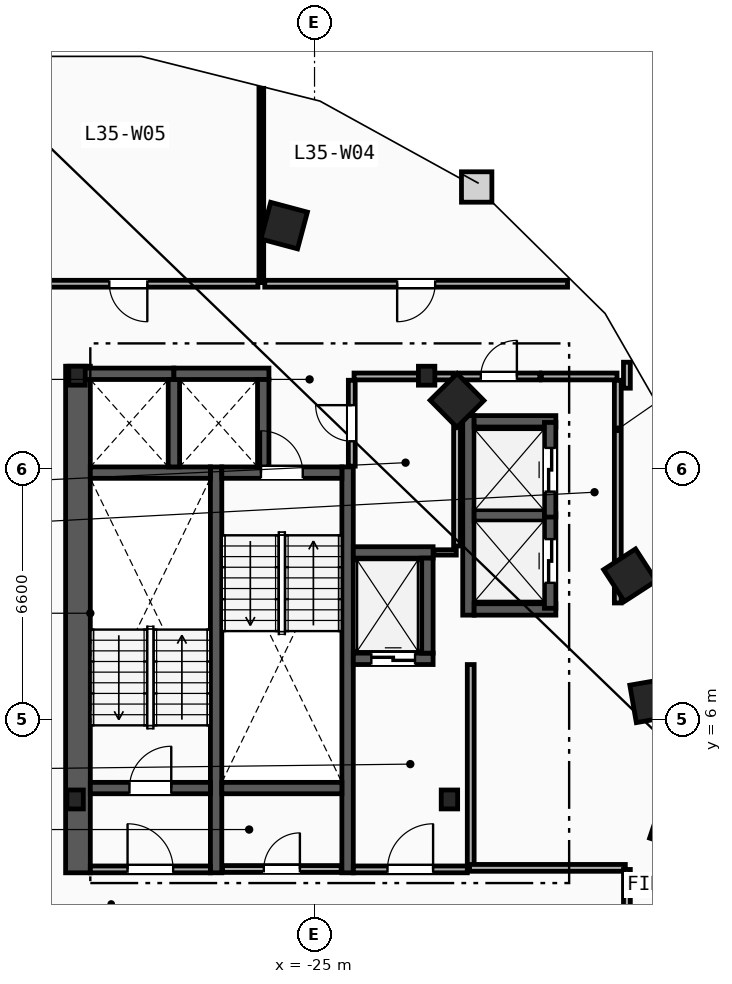
"""IFC4 building model, lengths in metres.
Left out: names, types, materials, properties, quantities, classifications, styles, units other than length and angle.
Written with IfcOpenShell. Run it as: python <this file> out.ifc"""

import sys

from ifc_helpers import new_model, si_unit, direction, frame, frame_2d, origin, origin_2d, place, context, subcontext, project, spatial, rectangle, i_section, extrude, element, fill, save


model = new_model("IFC4")
c1 = context("Model", 3, precision=1e-05, world=origin(), true_north=direction((0.0, 1.0)))
c2 = subcontext(c1, "Body", "Model", "MODEL_VIEW")
j1 = project(units=[si_unit("LENGTHUNIT", "METRE"), si_unit("PLANEANGLEUNIT", "RADIAN")], contexts=[c1])
p1 = place(None, origin())
s1 = spatial("IfcSite", under=j1, at=p1, CompositionType="ELEMENT")
p2 = place(p1, origin())
s2 = spatial("IfcBuilding", under=s1, at=p2, CompositionType="ELEMENT")
p3 = place(p2, frame((0.0, 0.0, 136.8)))
s3 = spatial("IfcBuildingStorey", under=s2, at=p3, CompositionType="ELEMENT", Elevation=136.8)
for number, where, z_axis, x_axis in (
    (1, (-31.3, 3.9, 0.0), (0.0, 0.0, 1.0), (1.0, 0.0, 0.0)),
    (2, (-21.45, 3.9, 0.0), (0.0, 0.0, 1.0), (1.0, 0.0, 0.0)),
    (3, (-22.05, 15.05, 0.0), (0.0, 0.0, 1.0), (1.0, 0.0, 0.0)),
    (4, (-31.25, 15.05, 0.0), (0.0, 0.0, 1.0), (1.0, 0.0, 0.0)),
):
    element("IfcColumn", number, at=place(p3, frame(where, z_axis=z_axis, x_axis=x_axis)), inside=s3, PredefinedType="COLUMN", context=c2, shape_type="SweptSolid", body=[
        extrude(i_section(OverallWidth=0.432, OverallDepth=0.498, WebThickness=0.056, FlangeThickness=0.089, FilletRadius=0.018, at=origin_2d()), origin(), (0.0, 0.0, 1.0), 3.6),
    ])
for number, where, z_axis, x_axis in (
    (5, (-15.55, 3.2, 0.0), (0.0, 0.0, 1.0), (0.315, 0.949, 0.0)),
    (6, (-16.125, 6.5, 0.0), (0.0, 0.0, 1.0), (-0.172, 0.985, 0.0)),
    (7, (-16.7, 9.8, 0.0), (0.0, 0.0, 1.0), (-0.544, 0.839, 0.0)),
    (8, (-21.25, 14.4, 0.0), (0.0, 0.0, 1.0), (-0.703, 0.711, 0.0)),
    (9, (-25.8, 19.0, 0.0), (0.0, 0.0, 1.0), (-0.966, 0.259, 0.0)),
):
    element("IfcColumn", number, at=place(p3, frame(where, z_axis=z_axis, x_axis=x_axis)), inside=s3, PredefinedType="COLUMN", context=c2, shape_type="SweptSolid", body=[
        extrude(rectangle(XDim=1.0, YDim=1.0, at=origin_2d()), origin(), (0.0, 0.0, 1.0), 3.6),
    ])
p4 = place(p3, frame((-31.225, 1.97, 0.0), z_axis=(0.0, 0.0, 1.0), x_axis=(0.0, 1.0, 0.0)))
e10 = element("IfcWall", 10, at=p4, inside=s3, PredefinedType="SHEAR", context=c2, shape_type="SweptSolid", body=[
    extrude(rectangle(XDim=13.33, YDim=0.65, at=frame_2d((6.665, 0.0))), origin(), (0.0, 0.0, 1.0), 3.36),
])
for number, where, z_axis, x_axis in (
    (11, (-27.59, 1.97, 0.0), (0.0, 0.0, 1.0), (0.0, 1.0, 0.0)),
    (12, (-24.13, 1.97, 0.0), (0.0, 0.0, 1.0), (0.0, 1.0, 0.0)),
):
    element("IfcWall", number, at=place(p3, frame(where, z_axis=z_axis, x_axis=x_axis)), inside=s3, PredefinedType="SHEAR", context=c2, shape_type="SweptSolid", body=[
        extrude(rectangle(XDim=10.68, YDim=0.3, at=frame_2d((5.34, 0.0))), origin(), (0.0, 0.0, 1.0), 3.36),
    ])
p5 = place(p3, frame((-30.9, 4.2, 0.0), z_axis=(0.0, 0.0, 1.0), x_axis=(1.0, 0.0, 0.0)))
e13 = element("IfcWall", 13, at=p5, inside=s3, PredefinedType="SHEAR", context=c2, shape_type="SweptSolid", body=[
    extrude(rectangle(XDim=3.16, YDim=0.3, at=frame_2d((1.58, 0.0))), origin(), (0.0, 0.0, 1.0), 3.36),
])
p6 = place(p5, frame((1.03, 0.0, 0.0)))
e14 = element("IfcOpeningElement", 14, at=p6, cuts=e13, PredefinedType="OPENING", context=c2, shape_type="SweptSolid", body=[
    extrude(rectangle(XDim=1.1, YDim=2.15, at=frame_2d((0.55, 1.075))), frame((0.0, 0.16, 0.0), z_axis=(0.0, -1.0, 0.0), x_axis=(1.0, 0.0, 0.0)), (0.0, 0.0, 1.0), 0.32),
])
p7 = place(p3, frame((-30.9, 12.5, 0.0), z_axis=(0.0, 0.0, 1.0), x_axis=(1.0, 0.0, 0.0)))
e15 = element("IfcWall", 15, at=p7, inside=s3, PredefinedType="SHEAR", context=c2, shape_type="SweptSolid", body=[
    extrude(rectangle(XDim=3.16, YDim=0.3, at=frame_2d((1.58, 0.0))), origin(), (0.0, 0.0, 1.0), 3.36),
])
p8 = place(p3, frame((-27.44, 12.5, 0.0), z_axis=(0.0, 0.0, 1.0), x_axis=(1.0, 0.0, 0.0)))
e16 = element("IfcWall", 16, at=p8, inside=s3, PredefinedType="SHEAR", context=c2, shape_type="SweptSolid", body=[
    extrude(rectangle(XDim=3.16, YDim=0.3, at=frame_2d((1.58, 0.0))), origin(), (0.0, 0.0, 1.0), 3.36),
])
p9 = place(p8, frame((1.03, 0.0, 0.0)))
e17 = element("IfcOpeningElement", 17, at=p9, cuts=e16, PredefinedType="OPENING", context=c2, shape_type="SweptSolid", body=[
    extrude(rectangle(XDim=1.1, YDim=2.15, at=frame_2d((0.55, 1.075))), frame((0.0, 0.16, 0.0), z_axis=(0.0, -1.0, 0.0), x_axis=(1.0, 0.0, 0.0)), (0.0, 0.0, 1.0), 0.32),
])
p10 = place(p3, frame((-27.44, 4.2, 0.0), z_axis=(0.0, 0.0, 1.0), x_axis=(1.0, 0.0, 0.0)))
e18 = element("IfcWall", 18, at=p10, inside=s3, PredefinedType="SHEAR", context=c2, shape_type="SweptSolid", body=[
    extrude(rectangle(XDim=3.16, YDim=0.3, at=frame_2d((1.58, 0.0))), origin(), (0.0, 0.0, 1.0), 3.36),
])
p11 = place(p3, frame((-20.89, 2.15, 0.0), z_axis=(0.0, 0.0, 1.0), x_axis=(0.0, 1.0, 0.0)))
e19 = element("IfcWall", 19, at=p11, inside=s3, PredefinedType="PARTITIONING", context=c2, shape_type="SweptSolid", body=[
    extrude(rectangle(XDim=5.3, YDim=0.18, at=frame_2d((2.65, 0.0))), origin(), (0.0, 0.0, 1.0), 3.36),
])
p12 = place(p3, frame((-23.98, 2.06, 0.0), z_axis=(0.0, 0.0, 1.0), x_axis=(1.0, 0.0, 0.0)))
e20 = element("IfcWall", 20, at=p12, inside=s3, PredefinedType="PARTITIONING", context=c2, shape_type="SweptSolid", body=[
    extrude(rectangle(XDim=3.0, YDim=0.18, at=frame_2d((1.5, 0.0))), origin(), (0.0, 0.0, 1.0), 3.36),
])
p13 = place(p12, frame((0.9, 0.0, 0.0)))
e21 = element("IfcOpeningElement", 21, at=p13, cuts=e20, PredefinedType="OPENING", context=c2, shape_type="SweptSolid", body=[
    extrude(rectangle(XDim=1.2, YDim=2.15, at=frame_2d((0.6, 1.075))), frame((0.0, 0.1, 0.0), z_axis=(0.0, -1.0, 0.0), x_axis=(1.0, 0.0, 0.0)), (0.0, 0.0, 1.0), 0.2),
])
p14 = place(p3, frame((-30.9, 2.06, 0.0), z_axis=(0.0, 0.0, 1.0), x_axis=(1.0, 0.0, 0.0)))
e22 = element("IfcWall", 22, at=p14, inside=s3, PredefinedType="PARTITIONING", context=c2, shape_type="SweptSolid", body=[
    extrude(rectangle(XDim=3.16, YDim=0.18, at=frame_2d((1.58, 0.0))), origin(), (0.0, 0.0, 1.0), 3.36),
])
p15 = place(p14, frame((0.98, 0.0, 0.0)))
e23 = element("IfcOpeningElement", 23, at=p15, cuts=e22, PredefinedType="OPENING", context=c2, shape_type="SweptSolid", body=[
    extrude(rectangle(XDim=1.2, YDim=2.15, at=frame_2d((0.6, 1.075))), frame((0.0, 0.1, 0.0), z_axis=(0.0, -1.0, 0.0), x_axis=(1.0, 0.0, 0.0)), (0.0, 0.0, 1.0), 0.2),
])
p16 = place(p3, frame((-23.98, 7.6, 0.0), z_axis=(0.0, 0.0, 1.0), x_axis=(1.0, 0.0, 0.0)))
e24 = element("IfcWall", 24, at=p16, inside=s3, PredefinedType="SHEAR", context=c2, shape_type="SweptSolid", body=[
    extrude(rectangle(XDim=2.1, YDim=0.3, at=frame_2d((1.05, 0.0))), origin(), (0.0, 0.0, 1.0), 3.36),
])
p17 = place(p16, frame((0.475, 0.0, 0.0)))
e25 = element("IfcOpeningElement", 25, at=p17, cuts=e24, PredefinedType="OPENING", context=c2, shape_type="SweptSolid", body=[
    extrude(rectangle(XDim=1.15, YDim=2.2, at=frame_2d((0.575, 1.1))), frame((0.0, 0.16, 0.0), z_axis=(0.0, -1.0, 0.0), x_axis=(1.0, 0.0, 0.0)), (0.0, 0.0, 1.0), 0.32),
])
p18 = place(p3, frame((-23.98, 10.4, 0.0), z_axis=(0.0, 0.0, 1.0), x_axis=(1.0, 0.0, 0.0)))
e26 = element("IfcWall", 26, at=p18, inside=s3, PredefinedType="SHEAR", context=c2, shape_type="SweptSolid", body=[
    extrude(rectangle(XDim=2.1, YDim=0.3, at=frame_2d((1.05, 0.0))), origin(), (0.0, 0.0, 1.0), 3.36),
])
for number, where, z_axis, x_axis in (
    (27, (-22.03, 7.75, 0.0), (0.0, 0.0, 1.0), (0.0, 1.0, 0.0)),
    (28, (-31.2, 15.1, 0.0), (0.0, 0.0, 1.0), (1.0, 0.0, 0.0)),
):
    element("IfcWall", number, at=place(p3, frame(where, z_axis=z_axis, x_axis=x_axis)), inside=s3, PredefinedType="SHEAR", context=c2, shape_type="SweptSolid", body=[
        extrude(rectangle(XDim=2.5, YDim=0.3, at=frame_2d((1.25, 0.0))), origin(), (0.0, 0.0, 1.0), 3.36),
    ])
p19 = place(p3, frame((-28.7, 12.65, 0.0), z_axis=(0.0, 0.0, 1.0), x_axis=(0.0, 1.0, 0.0)))
e29 = element("IfcWall", 29, at=p19, inside=s3, PredefinedType="SHEAR", context=c2, shape_type="SweptSolid", body=[
    extrude(rectangle(XDim=2.3, YDim=0.3, at=frame_2d((1.15, 0.0))), origin(), (0.0, 0.0, 1.0), 3.36),
])
p20 = place(p3, frame((-28.7, 15.1, 0.0), z_axis=(0.0, 0.0, 1.0), x_axis=(1.0, 0.0, 0.0)))
e30 = element("IfcWall", 30, at=p20, inside=s3, PredefinedType="SHEAR", context=c2, shape_type="SweptSolid", body=[
    extrude(rectangle(XDim=2.5, YDim=0.3, at=frame_2d((1.25, 0.0))), origin(), (0.0, 0.0, 1.0), 3.36),
])
p21 = place(p3, frame((-26.35, 12.65, 0.0), z_axis=(0.0, 0.0, 1.0), x_axis=(0.0, 1.0, 0.0)))
e31 = element("IfcWall", 31, at=p21, inside=s3, PredefinedType="SHEAR", context=c2, shape_type="SweptSolid", body=[
    extrude(rectangle(XDim=2.3, YDim=0.3, at=frame_2d((1.15, 0.0))), origin(), (0.0, 0.0, 1.0), 3.36),
])
p22 = place(p3, frame((-20.95, 8.75, 0.0), z_axis=(0.0, 0.0, 1.0), x_axis=(0.0, 1.0, 0.0)))
e32 = element("IfcWall", 32, at=p22, inside=s3, PredefinedType="SHEAR", context=c2, shape_type="SweptSolid", body=[
    extrude(rectangle(XDim=5.25, YDim=0.3, at=frame_2d((2.625, 0.0))), origin(), (0.0, 0.0, 1.0), 3.36),
])
for number, where, z_axis, x_axis in (
    (33, (-20.8, 8.9, 0.0), (0.0, 0.0, 1.0), (1.0, 0.0, 0.0)),
    (34, (-20.8, 13.85, 0.0), (0.0, 0.0, 1.0), (1.0, 0.0, 0.0)),
):
    element("IfcWall", number, at=place(p3, frame(where, z_axis=z_axis, x_axis=x_axis)), inside=s3, PredefinedType="SHEAR", context=c2, shape_type="SweptSolid", body=[
        extrude(rectangle(XDim=2.15, YDim=0.3, at=frame_2d((1.075, 0.0))), origin(), (0.0, 0.0, 1.0), 3.36),
    ])
p23 = place(p3, frame((-20.8, 11.375, 0.0), z_axis=(0.0, 0.0, 1.0), x_axis=(1.0, 0.0, 0.0)))
e35 = element("IfcWall", 35, at=p23, inside=s3, PredefinedType="SHEAR", context=c2, shape_type="SweptSolid", body=[
    extrude(rectangle(XDim=1.85, YDim=0.3, at=frame_2d((0.925, 0.0))), origin(), (0.0, 0.0, 1.0), 3.36),
])
p24 = place(p3, frame((-18.8, 8.93, 0.0), z_axis=(0.0, 0.0, 1.0), x_axis=(0.0, 1.0, 0.0)))
e36 = element("IfcWall", 36, at=p24, inside=s3, PredefinedType="SHEAR", context=c2, shape_type="SweptSolid", body=[
    extrude(rectangle(XDim=2.49, YDim=0.3, at=frame_2d((1.245, 0.0))), origin(), (0.0, 0.0, 1.0), 3.36),
])
p25 = place(p24, frame((0.67, 0.0, 0.0)))
e37 = element("IfcOpeningElement", 37, at=p25, cuts=e36, PredefinedType="OPENING", context=c2, shape_type="SweptSolid", body=[
    extrude(rectangle(XDim=1.15, YDim=2.2, at=frame_2d((0.575, 1.1))), frame((0.0, 0.16, 0.0), z_axis=(0.0, -1.0, 0.0), x_axis=(1.0, 0.0, 0.0)), (0.0, 0.0, 1.0), 0.32),
])
p26 = place(p3, frame((-18.8, 11.33, 0.0), z_axis=(0.0, 0.0, 1.0), x_axis=(0.0, 1.0, 0.0)))
e38 = element("IfcWall", 38, at=p26, inside=s3, PredefinedType="SHEAR", context=c2, shape_type="SweptSolid", body=[
    extrude(rectangle(XDim=2.49, YDim=0.3, at=frame_2d((1.245, 0.0))), origin(), (0.0, 0.0, 1.0), 3.36),
])
p27 = place(p26, frame((0.67, 0.0, 0.0)))
e39 = element("IfcOpeningElement", 39, at=p27, cuts=e38, PredefinedType="OPENING", context=c2, shape_type="SweptSolid", body=[
    extrude(rectangle(XDim=1.15, YDim=2.2, at=frame_2d((0.575, 1.1))), frame((0.0, 0.16, 0.0), z_axis=(0.0, -1.0, 0.0), x_axis=(1.0, 0.0, 0.0)), (0.0, 0.0, 1.0), 0.32),
])
p28 = place(p3, frame((-17.02, 9.07, 0.0), z_axis=(0.0, 0.0, 1.0), x_axis=(0.0, 1.0, 0.0)))
e40 = element("IfcWall", 40, at=p28, inside=s3, PredefinedType="PARTITIONING", context=c2, shape_type="SweptSolid", body=[
    extrude(rectangle(XDim=5.86, YDim=0.18, at=frame_2d((2.93, 0.0))), origin(), (0.0, 0.0, 1.0), 3.36),
])
p29 = place(p3, frame((-21.23, 15.03, 0.0), z_axis=(0.0, 0.0, 1.0), x_axis=(1.0, 0.0, 0.0)))
e41 = element("IfcWall", 41, at=p29, inside=s3, PredefinedType="PARTITIONING", context=c2, shape_type="SweptSolid", body=[
    extrude(rectangle(XDim=2.16, YDim=0.18, at=frame_2d((1.08, 0.0))), origin(), (0.0, 0.0, 1.0), 3.36),
])
p30 = place(p29, frame((0.605, 0.0, 0.0)))
e42 = element("IfcOpeningElement", 42, at=p30, cuts=e41, PredefinedType="OPENING", context=c2, shape_type="SweptSolid", body=[
    extrude(rectangle(XDim=0.95, YDim=2.1, at=frame_2d((0.475, 1.05))), frame((0.0, 0.1, 0.0), z_axis=(0.0, -1.0, 0.0), x_axis=(1.0, 0.0, 0.0)), (0.0, 0.0, 1.0), 0.2),
])
p31 = place(p3, frame((-19.03, 15.03, 0.0), z_axis=(0.0, 0.0, 1.0), x_axis=(1.0, 0.0, 0.0)))
e43 = element("IfcWall", 43, at=p31, inside=s3, PredefinedType="PARTITIONING", context=c2, shape_type="SweptSolid", body=[
    extrude(rectangle(XDim=1.99, YDim=0.18, at=frame_2d((0.995, 0.0))), origin(), (0.0, 0.0, 1.0), 3.36),
])
p32 = place(p3, frame((-21.86, 10.4, 0.0), z_axis=(0.0, 0.0, 1.0), x_axis=(1.0, 0.0, 0.0)))
e44 = element("IfcWall", 44, at=p32, inside=s3, PredefinedType="PARTITIONING", context=c2, shape_type="SweptSolid", body=[
    extrude(rectangle(XDim=0.59, YDim=0.14, at=frame_2d((0.295, 0.0))), origin(), (0.0, 0.0, 1.0), 3.36),
])
p33 = place(p3, frame((-21.25, 10.57, 0.0), z_axis=(0.0, 0.0, 1.0), x_axis=(0.0, 1.0, 0.0)))
e45 = element("IfcWall", 45, at=p33, inside=s3, PredefinedType="PARTITIONING", context=c2, shape_type="SweptSolid", body=[
    extrude(rectangle(XDim=4.36, YDim=0.18, at=frame_2d((2.18, 0.0))), origin(), (0.0, 0.0, 1.0), 3.36),
])
p34 = place(p3, frame((-23.96, 15.03, 0.0), z_axis=(0.0, 0.0, 1.0), x_axis=(1.0, 0.0, 0.0)))
e46 = element("IfcWall", 46, at=p34, inside=s3, PredefinedType="PARTITIONING", context=c2, shape_type="SweptSolid", body=[
    extrude(rectangle(XDim=2.61, YDim=0.18, at=frame_2d((1.305, 0.0))), origin(), (0.0, 0.0, 1.0), 2.433),
])
p35 = place(p3, frame((-27.42, 2.07, 0.0), z_axis=(0.0, 0.0, 1.0), x_axis=(1.0, 0.0, 0.0)))
e47 = element("IfcWall", 47, at=p35, inside=s3, PredefinedType="PARTITIONING", context=c2, shape_type="SweptSolid", body=[
    extrude(rectangle(XDim=3.12, YDim=0.18, at=frame_2d((1.56, 0.0))), origin(), (0.0, 0.0, 1.0), 3.36),
])
p36 = place(p35, frame((1.085, 0.0, 0.0)))
e48 = element("IfcOpeningElement", 48, at=p36, cuts=e47, PredefinedType="OPENING", context=c2, shape_type="SweptSolid", body=[
    extrude(rectangle(XDim=0.95, YDim=2.1, at=frame_2d((0.475, 1.05))), frame((0.0, 0.1, 0.0), z_axis=(0.0, -1.0, 0.0), x_axis=(1.0, 0.0, 0.0)), (0.0, 0.0, 1.0), 0.2),
])
p37 = place(p3, frame((-24.02, 12.67, 0.0), z_axis=(0.0, 0.0, 1.0), x_axis=(0.0, 1.0, 0.0)))
e49 = element("IfcWall", 49, at=p37, inside=s3, PredefinedType="PARTITIONING", context=c2, shape_type="SweptSolid", body=[
    extrude(rectangle(XDim=2.26, YDim=0.18, at=frame_2d((1.13, 0.0))), origin(), (0.0, 0.0, 1.0), 3.36),
])
p38 = place(p37, frame((0.655, 0.0, 0.0)))
e50 = element("IfcOpeningElement", 50, at=p38, cuts=e49, PredefinedType="OPENING", context=c2, shape_type="SweptSolid", body=[
    extrude(rectangle(XDim=0.95, YDim=2.1, at=frame_2d((0.475, 1.05))), frame((0.0, 0.1, 0.0), z_axis=(0.0, -1.0, 0.0), x_axis=(1.0, 0.0, 0.0)), (0.0, 0.0, 1.0), 0.2),
])
p39 = place(p3, frame((-26.4, 17.5, 0.0), z_axis=(0.0, 0.0, 1.0), x_axis=(0.0, 1.0, 0.0)))
e51 = element("IfcWall", 51, at=p39, inside=s3, PredefinedType="PARTITIONING", context=c2, shape_type="SweptSolid", body=[
    extrude(rectangle(XDim=5.111, YDim=0.125, at=frame_2d((2.556, 0.0))), origin(), (0.0, 0.0, 1.0), 3.36),
])
p40 = place(p3, frame((-16.822, 2.1, 0.0), z_axis=(0.0, 0.0, 1.0), x_axis=(-1.0, 0.0, 0.0)))
e52 = element("IfcWall", 52, at=p40, inside=s3, PredefinedType="PARTITIONING", context=c2, shape_type="SweptSolid", body=[
    extrude(rectangle(XDim=4.098, YDim=0.18, at=frame_2d((2.049, 0.0))), origin(), (0.0, 0.0, 1.0), 3.36),
])
p41 = place(p3, frame((-16.78, -0.329, 0.0), z_axis=(0.0, 0.0, 1.0), x_axis=(0.0, 1.0, 0.0)))
e53 = element("IfcWall", 53, at=p41, inside=s3, PredefinedType="PARTITIONING", context=c2, shape_type="SweptSolid", body=[
    extrude(rectangle(XDim=2.387, YDim=0.18, at=frame_2d((1.194, 0.0))), origin(), (0.0, 0.0, 1.0), 3.36),
])
p42 = place(p3, frame((-16.78, 14.721, 0.0), z_axis=(0.0, 0.0, 1.0), x_axis=(0.0, 1.0, 0.0)))
e54 = element("IfcWall", 54, at=p42, inside=s3, PredefinedType="PARTITIONING", context=c2, shape_type="SweptSolid", body=[
    extrude(rectangle(XDim=0.684, YDim=0.18, at=frame_2d((0.342, 0.0))), origin(), (0.0, 0.0, 1.0), 3.36),
])
p43 = place(p3, frame((-18.342, 17.47, 0.0), z_axis=(0.0, 0.0, 1.0), x_axis=(-1.0, 0.0, 0.0)))
e55 = element("IfcWall", 55, at=p43, inside=s3, PredefinedType="PARTITIONING", context=c2, shape_type="SweptSolid", body=[
    extrude(rectangle(XDim=7.968, YDim=0.18, at=frame_2d((3.984, 0.0))), origin(), (0.0, 0.0, 1.0), 3.36),
])
p44 = place(p43, frame((3.484, 0.0, 0.0)))
e56 = element("IfcOpeningElement", 56, at=p44, cuts=e55, PredefinedType="OPENING", context=c2, shape_type="SweptSolid", body=[
    extrude(rectangle(XDim=1.0, YDim=2.15, at=frame_2d((0.5, 1.075))), frame((0.0, 0.1, 0.0), z_axis=(0.0, -1.0, 0.0), x_axis=(1.0, 0.0, 0.0)), (0.0, 0.0, 1.0), 0.2),
])
p45 = place(p3, frame((-26.49, 17.47, 0.0), z_axis=(0.0, 0.0, 1.0), x_axis=(-1.0, 0.0, 0.0)))
e57 = element("IfcWall", 57, at=p45, inside=s3, PredefinedType="PARTITIONING", context=c2, shape_type="SweptSolid", body=[
    extrude(rectangle(XDim=6.82, YDim=0.18, at=frame_2d((3.41, 0.0))), origin(), (0.0, 0.0, 1.0), 3.36),
])
p46 = place(p45, frame((2.91, 0.0, 0.0)))
e58 = element("IfcOpeningElement", 58, at=p46, cuts=e57, PredefinedType="OPENING", context=c2, shape_type="SweptSolid", body=[
    extrude(rectangle(XDim=1.0, YDim=2.15, at=frame_2d((0.5, 1.075))), frame((0.0, 0.1, 0.0), z_axis=(0.0, -1.0, 0.0), x_axis=(1.0, 0.0, 0.0)), (0.0, 0.0, 1.0), 0.2),
])
p47 = place(p6, origin())
e59 = element("IfcDoor", 59, at=p47, inside=s3, OperationType="SINGLE_SWING_RIGHT", PredefinedType="DOOR", context=c2, shape_type="SweptSolid", body=[
    extrude(rectangle(XDim=1.1, YDim=2.15, at=frame_2d((0.55, 1.075))), frame((0.0, 0.025, 0.0), z_axis=(0.0, -1.0, 0.0), x_axis=(1.0, 0.0, 0.0)), (0.0, 0.0, 1.0), 0.05),
])
fill(e14, e59)
p48 = place(p9, origin())
e60 = element("IfcDoor", 60, at=p48, inside=s3, OperationType="SINGLE_SWING_LEFT", PredefinedType="DOOR", context=c2, shape_type="SweptSolid", body=[
    extrude(rectangle(XDim=1.1, YDim=2.15, at=frame_2d((0.55, 1.075))), frame((0.0, 0.025, 0.0), z_axis=(0.0, -1.0, 0.0), x_axis=(1.0, 0.0, 0.0)), (0.0, 0.0, 1.0), 0.05),
])
fill(e17, e60)
p49 = place(p13, origin())
e61 = element("IfcDoor", 61, at=p49, inside=s3, OperationType="SINGLE_SWING_RIGHT", PredefinedType="DOOR", context=c2, shape_type="SweptSolid", body=[
    extrude(rectangle(XDim=1.2, YDim=2.15, at=frame_2d((0.6, 1.075))), frame((0.0, 0.025, 0.0), z_axis=(0.0, -1.0, 0.0), x_axis=(1.0, 0.0, 0.0)), (0.0, 0.0, 1.0), 0.05),
])
fill(e21, e61)
p50 = place(p15, origin())
e62 = element("IfcDoor", 62, at=p50, inside=s3, OperationType="SINGLE_SWING_LEFT", PredefinedType="DOOR", context=c2, shape_type="SweptSolid", body=[
    extrude(rectangle(XDim=1.2, YDim=2.15, at=frame_2d((0.6, 1.075))), frame((0.0, 0.025, 0.0), z_axis=(0.0, -1.0, 0.0), x_axis=(1.0, 0.0, 0.0)), (0.0, 0.0, 1.0), 0.05),
])
fill(e23, e62)
p51 = place(p17, origin())
e63 = element("IfcDoor", 63, at=p51, inside=s3, OperationType="SLIDING_TO_LEFT", PredefinedType="TRAPDOOR", context=c2, shape_type="SweptSolid", body=[
    extrude(rectangle(XDim=1.15, YDim=2.2, at=frame_2d((0.575, 1.1))), frame((0.0, 0.025, 0.0), z_axis=(0.0, -1.0, 0.0), x_axis=(1.0, 0.0, 0.0)), (0.0, 0.0, 1.0), 0.05),
])
fill(e25, e63)
p52 = place(p25, origin())
e64 = element("IfcDoor", 64, at=p52, inside=s3, OperationType="SLIDING_TO_LEFT", PredefinedType="TRAPDOOR", context=c2, shape_type="SweptSolid", body=[
    extrude(rectangle(XDim=1.15, YDim=2.2, at=frame_2d((0.575, 1.1))), frame((0.0, 0.025, 0.0), z_axis=(0.0, -1.0, 0.0), x_axis=(1.0, 0.0, 0.0)), (0.0, 0.0, 1.0), 0.05),
])
fill(e37, e64)
p53 = place(p27, origin())
e65 = element("IfcDoor", 65, at=p53, inside=s3, OperationType="SLIDING_TO_LEFT", PredefinedType="TRAPDOOR", context=c2, shape_type="SweptSolid", body=[
    extrude(rectangle(XDim=1.15, YDim=2.2, at=frame_2d((0.575, 1.1))), frame((0.0, 0.025, 0.0), z_axis=(0.0, -1.0, 0.0), x_axis=(1.0, 0.0, 0.0)), (0.0, 0.0, 1.0), 0.05),
])
fill(e39, e65)
p54 = place(p44, origin())
e66 = element("IfcDoor", 66, at=p54, inside=s3, OperationType="SINGLE_SWING_RIGHT", PredefinedType="DOOR", context=c2, shape_type="SweptSolid", body=[
    extrude(rectangle(XDim=1.0, YDim=2.15, at=frame_2d((0.5, 1.075))), frame((0.0, 0.025, 0.0), z_axis=(0.0, -1.0, 0.0), x_axis=(1.0, 0.0, 0.0)), (0.0, 0.0, 1.0), 0.05),
])
fill(e56, e66)
p55 = place(p46, origin())
e67 = element("IfcDoor", 67, at=p55, inside=s3, OperationType="SINGLE_SWING_LEFT", PredefinedType="DOOR", context=c2, shape_type="SweptSolid", body=[
    extrude(rectangle(XDim=1.0, YDim=2.15, at=frame_2d((0.5, 1.075))), frame((0.0, 0.025, 0.0), z_axis=(0.0, -1.0, 0.0), x_axis=(1.0, 0.0, 0.0)), (0.0, 0.0, 1.0), 0.05),
])
fill(e58, e67)
p56 = place(p36, origin())
e68 = element("IfcDoor", 68, at=p56, inside=s3, OperationType="SINGLE_SWING_RIGHT", PredefinedType="DOOR", context=c2, shape_type="SweptSolid", body=[
    extrude(rectangle(XDim=0.95, YDim=2.1, at=frame_2d((0.475, 1.05))), frame((0.0, 0.025, 0.0), z_axis=(0.0, -1.0, 0.0), x_axis=(1.0, 0.0, 0.0)), (0.0, 0.0, 1.0), 0.05),
])
fill(e48, e68)
p57 = place(p38, origin())
e69 = element("IfcDoor", 69, at=p57, inside=s3, OperationType="SINGLE_SWING_RIGHT", PredefinedType="DOOR", context=c2, shape_type="SweptSolid", body=[
    extrude(rectangle(XDim=0.95, YDim=2.1, at=frame_2d((0.475, 1.05))), frame((0.0, 0.025, 0.0), z_axis=(0.0, -1.0, 0.0), x_axis=(1.0, 0.0, 0.0)), (0.0, 0.0, 1.0), 0.05),
])
fill(e50, e69)
p58 = place(p30, origin())
e70 = element("IfcDoor", 70, at=p58, inside=s3, OperationType="SINGLE_SWING_RIGHT", PredefinedType="DOOR", context=c2, shape_type="SweptSolid", body=[
    extrude(rectangle(XDim=0.95, YDim=2.1, at=frame_2d((0.475, 1.05))), frame((0.0, 0.025, 0.0), z_axis=(0.0, -1.0, 0.0), x_axis=(1.0, 0.0, 0.0)), (0.0, 0.0, 1.0), 0.05),
])
fill(e42, e70)
save(model, sys.argv[1])
